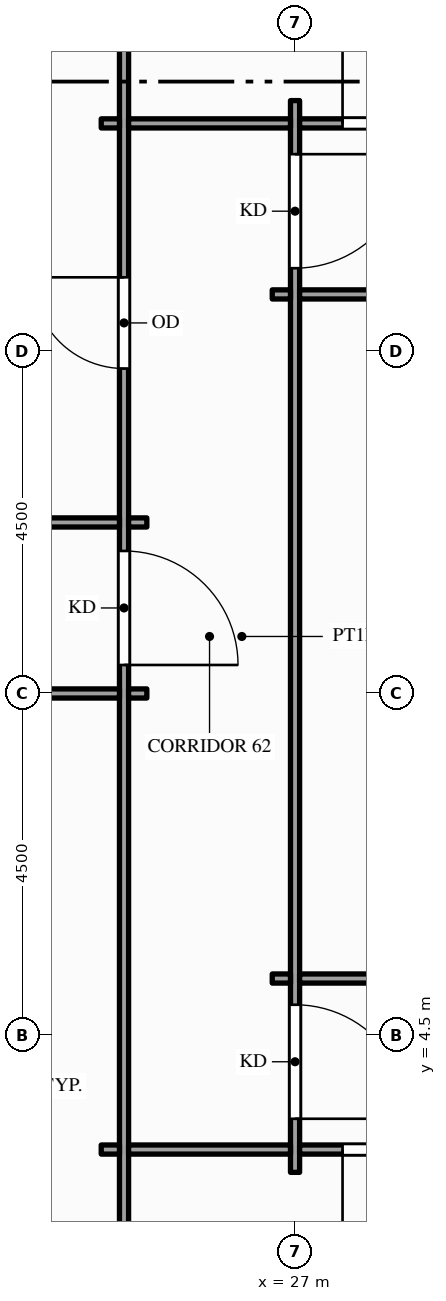
"""IFC4 building model, lengths in metres.
Left out: names, types, materials, properties, quantities, classifications, styles, units other than length and angle.
Written with IfcOpenShell. Run it as: python <this file> out.ifc"""

import sys

from ifc_helpers import new_model, si_unit, direction, frame, frame_2d, origin, place, context, subcontext, project, spatial, rectangle, extrude, element, fill, save


model = new_model("IFC4")
c1 = context("Model", 3, precision=1e-05, world=origin(), true_north=direction((0.0, 1.0)))
c2 = subcontext(c1, "Body", "Model", "MODEL_VIEW")
j1 = project(units=[si_unit("LENGTHUNIT", "METRE"), si_unit("PLANEANGLEUNIT", "RADIAN")], contexts=[c1])
p1 = place(None, origin())
s1 = spatial("IfcSite", under=j1, at=p1, CompositionType="ELEMENT")
p2 = place(p1, origin())
s2 = spatial("IfcBuilding", under=s1, at=p2, CompositionType="ELEMENT")
p3 = place(p2, frame((0.0, 0.0, 195.0)))
s3 = spatial("IfcBuildingStorey", under=s2, at=p3, CompositionType="ELEMENT", Elevation=195.0)
p4 = place(p3, frame((24.75, -1.35, 0.0), z_axis=(0.0, 0.0, 1.0), x_axis=(0.0, 1.0, 0.0)))
e1 = element("IfcWall", 1, at=p4, inside=s3, PredefinedType="PARTITIONING", context=c2, shape_type="SweptSolid", body=[
    extrude(rectangle(XDim=24.101, YDim=0.12, at=frame_2d((12.05, 0.0))), origin(), (0.0, 0.0, 1.0), 2.76),
])
p5 = place(p4, frame((10.725, 0.0, 0.0)))
e2 = element("IfcOpeningElement", 2, at=p5, cuts=e1, PredefinedType="OPENING", context=c2, shape_type="SweptSolid", body=[
    extrude(rectangle(XDim=1.5, YDim=2.1, at=frame_2d((0.75, 1.05))), frame((0.0, 0.07, 0.0), z_axis=(0.0, -1.0, 0.0), x_axis=(1.0, 0.0, 0.0)), (0.0, 0.0, 1.0), 0.14),
])
p6 = place(p4, frame((14.625, 0.0, 0.0)))
e3 = element("IfcOpeningElement", 3, at=p6, cuts=e1, PredefinedType="OPENING", context=c2, shape_type="SweptSolid", body=[
    extrude(rectangle(XDim=1.2, YDim=2.1, at=frame_2d((0.6, 1.05))), frame((0.0, 0.07, 0.0), z_axis=(0.0, -1.0, 0.0), x_axis=(1.0, 0.0, 0.0)), (0.0, 0.0, 1.0), 0.14),
])
p7 = place(p3, frame((27.0, 2.7, 0.0), z_axis=(0.0, 0.0, 1.0), x_axis=(0.0, 1.0, 0.0)))
e4 = element("IfcWall", 4, at=p7, inside=s3, PredefinedType="PARTITIONING", context=c2, shape_type="SweptSolid", body=[
    extrude(rectangle(XDim=14.1, YDim=0.12, at=frame_2d((7.05, 0.0))), origin(), (0.0, 0.0, 1.0), 2.87),
])
p8 = place(p7, frame((0.705, 0.0, 0.0)))
e5 = element("IfcOpeningElement", 5, at=p8, cuts=e4, PredefinedType="OPENING", context=c2, shape_type="SweptSolid", body=[
    extrude(rectangle(XDim=1.5, YDim=2.1, at=frame_2d((0.75, 1.05))), frame((0.0, 0.07, 0.0), z_axis=(0.0, -1.0, 0.0), x_axis=(1.0, 0.0, 0.0)), (0.0, 0.0, 1.0), 0.14),
])
p9 = place(p7, frame((11.895, 0.0, 0.0)))
e6 = element("IfcOpeningElement", 6, at=p9, cuts=e4, PredefinedType="OPENING", context=c2, shape_type="SweptSolid", body=[
    extrude(rectangle(XDim=1.5, YDim=2.1, at=frame_2d((0.75, 1.05))), frame((0.0, 0.07, 0.0), z_axis=(0.0, -1.0, 0.0), x_axis=(1.0, 0.0, 0.0)), (0.0, 0.0, 1.0), 0.14),
])
p10 = place(p3, frame((24.45, 3.0, 0.0), z_axis=(0.0, 0.0, 1.0), x_axis=(1.0, 0.0, 0.0)))
e7 = element("IfcWall", 7, at=p10, inside=s3, PredefinedType="PARTITIONING", context=c2, shape_type="SweptSolid", body=[
    extrude(rectangle(XDim=0.24, YDim=0.12, at=frame_2d((0.12, 0.0))), origin(), (0.0, 0.0, 1.0), 2.76),
])
p11 = place(p3, frame((24.81, 3.0, 0.0), z_axis=(0.0, 0.0, 1.0), x_axis=(1.0, 0.0, 0.0)))
e8 = element("IfcWall", 8, at=p11, inside=s3, PredefinedType="PARTITIONING", context=c2, shape_type="SweptSolid", body=[
    extrude(rectangle(XDim=2.13, YDim=0.12, at=frame_2d((1.065, 0.0))), origin(), (0.0, 0.0, 1.0), 2.76),
])
p12 = place(p3, frame((27.06, 3.0, 0.0), z_axis=(0.0, 0.0, 1.0), x_axis=(1.0, 0.0, 0.0)))
e9 = element("IfcWall", 9, at=p12, inside=s3, PredefinedType="PARTITIONING", context=c2, shape_type="SweptSolid", body=[
    extrude(rectangle(XDim=2.13, YDim=0.12, at=frame_2d((1.065, 0.0))), origin(), (0.0, 0.0, 1.0), 2.87),
])
p13 = place(p12, frame((0.565, 0.0, 0.0)))
e10 = element("IfcOpeningElement", 10, at=p13, cuts=e9, PredefinedType="OPENING", context=c2, shape_type="SweptSolid", body=[
    extrude(rectangle(XDim=1.0, YDim=2.1, at=frame_2d((0.5, 1.05))), frame((0.0, 0.07, 0.0), z_axis=(0.0, -1.0, 0.0), x_axis=(1.0, 0.0, 0.0)), (0.0, 0.0, 1.0), 0.14),
])
p14 = place(p3, frame((26.7, 5.25, 0.0), z_axis=(0.0, 0.0, 1.0), x_axis=(1.0, 0.0, 0.0)))
e11 = element("IfcWall", 11, at=p14, inside=s3, PredefinedType="PARTITIONING", context=c2, shape_type="SweptSolid", body=[
    extrude(rectangle(XDim=0.24, YDim=0.12, at=frame_2d((0.12, 0.0))), origin(), (0.0, 0.0, 1.0), 2.87),
])
p15 = place(p3, frame((27.06, 5.25, 0.0), z_axis=(0.0, 0.0, 1.0), x_axis=(1.0, 0.0, 0.0)))
e12 = element("IfcWall", 12, at=p15, inside=s3, PredefinedType="PARTITIONING", context=c2, shape_type="SweptSolid", body=[
    extrude(rectangle(XDim=8.88, YDim=0.12, at=frame_2d((4.44, 0.0))), origin(), (0.0, 0.0, 1.0), 2.87),
])
p16 = place(p15, frame((3.54, 0.0, 0.0)))
e13 = element("IfcOpeningElement", 13, at=p16, cuts=e12, PredefinedType="OPENING", context=c2, shape_type="SweptSolid", body=[
    extrude(rectangle(XDim=1.8, YDim=2.1, at=frame_2d((0.9, 1.05))), frame((0.0, 0.07, 0.0), z_axis=(0.0, -1.0, 0.0), x_axis=(1.0, 0.0, 0.0)), (0.0, 0.0, 1.0), 0.14),
])
p17 = place(p3, frame((18.06, 9.0, 0.0), z_axis=(0.0, 0.0, 1.0), x_axis=(1.0, 0.0, 0.0)))
e14 = element("IfcWall", 14, at=p17, inside=s3, PredefinedType="PARTITIONING", context=c2, shape_type="SweptSolid", body=[
    extrude(rectangle(XDim=6.63, YDim=0.12, at=frame_2d((3.315, 0.0))), origin(), (0.0, 0.0, 1.0), 2.76),
])
p18 = place(p17, frame((2.715, 0.0, 0.0)))
e15 = element("IfcOpeningElement", 15, at=p18, cuts=e14, PredefinedType="OPENING", context=c2, shape_type="SweptSolid", body=[
    extrude(rectangle(XDim=1.2, YDim=2.1, at=frame_2d((0.6, 1.05))), frame((0.0, 0.07, 0.0), z_axis=(0.0, -1.0, 0.0), x_axis=(1.0, 0.0, 0.0)), (0.0, 0.0, 1.0), 0.14),
])
p19 = place(p3, frame((24.81, 9.0, 0.0), z_axis=(0.0, 0.0, 1.0), x_axis=(1.0, 0.0, 0.0)))
e16 = element("IfcWall", 16, at=p19, inside=s3, PredefinedType="PARTITIONING", context=c2, shape_type="SweptSolid", body=[
    extrude(rectangle(XDim=0.24, YDim=0.12, at=frame_2d((0.12, 0.0))), origin(), (0.0, 0.0, 1.0), 2.76),
])
p20 = place(p3, frame((11.31, 11.25, 0.0), z_axis=(0.0, 0.0, 1.0), x_axis=(1.0, 0.0, 0.0)))
e17 = element("IfcWall", 17, at=p20, inside=s3, PredefinedType="PARTITIONING", context=c2, shape_type="SweptSolid", body=[
    extrude(rectangle(XDim=13.38, YDim=0.12, at=frame_2d((6.69, 0.0))), origin(), (0.0, 0.0, 1.0), 2.76),
])
p21 = place(p20, frame((3.54, 0.0, 0.0)))
e18 = element("IfcOpeningElement", 18, at=p21, cuts=e17, PredefinedType="OPENING", context=c2, shape_type="SweptSolid", body=[
    extrude(rectangle(XDim=1.8, YDim=2.1, at=frame_2d((0.9, 1.05))), frame((0.0, 0.07, 0.0), z_axis=(0.0, -1.0, 0.0), x_axis=(1.0, 0.0, 0.0)), (0.0, 0.0, 1.0), 0.14),
])
p22 = place(p3, frame((24.81, 11.25, 0.0), z_axis=(0.0, 0.0, 1.0), x_axis=(1.0, 0.0, 0.0)))
e19 = element("IfcWall", 19, at=p22, inside=s3, PredefinedType="PARTITIONING", context=c2, shape_type="SweptSolid", body=[
    extrude(rectangle(XDim=0.24, YDim=0.12, at=frame_2d((0.12, 0.0))), origin(), (0.0, 0.0, 1.0), 2.76),
])
p23 = place(p3, frame((26.7, 14.25, 0.0), z_axis=(0.0, 0.0, 1.0), x_axis=(1.0, 0.0, 0.0)))
e20 = element("IfcWall", 20, at=p23, inside=s3, PredefinedType="PARTITIONING", context=c2, shape_type="SweptSolid", body=[
    extrude(rectangle(XDim=0.24, YDim=0.12, at=frame_2d((0.12, 0.0))), origin(), (0.0, 0.0, 1.0), 2.87),
])
p24 = place(p3, frame((27.06, 14.25, 0.0), z_axis=(0.0, 0.0, 1.0), x_axis=(1.0, 0.0, 0.0)))
e21 = element("IfcWall", 21, at=p24, inside=s3, PredefinedType="PARTITIONING", context=c2, shape_type="SweptSolid", body=[
    extrude(rectangle(XDim=8.88, YDim=0.12, at=frame_2d((4.44, 0.0))), origin(), (0.0, 0.0, 1.0), 2.87),
])
p25 = place(p3, frame((24.45, 16.5, 0.0), z_axis=(0.0, 0.0, 1.0), x_axis=(1.0, 0.0, 0.0)))
e22 = element("IfcWall", 22, at=p25, inside=s3, PredefinedType="PARTITIONING", context=c2, shape_type="SweptSolid", body=[
    extrude(rectangle(XDim=0.24, YDim=0.12, at=frame_2d((0.12, 0.0))), origin(), (0.0, 0.0, 1.0), 2.76),
])
p26 = place(p3, frame((24.81, 16.5, 0.0), z_axis=(0.0, 0.0, 1.0), x_axis=(1.0, 0.0, 0.0)))
e23 = element("IfcWall", 23, at=p26, inside=s3, PredefinedType="PARTITIONING", context=c2, shape_type="SweptSolid", body=[
    extrude(rectangle(XDim=2.13, YDim=0.12, at=frame_2d((1.065, 0.0))), origin(), (0.0, 0.0, 1.0), 2.76),
])
p27 = place(p3, frame((27.06, 16.5, 0.0), z_axis=(0.0, 0.0, 1.0), x_axis=(1.0, 0.0, 0.0)))
e24 = element("IfcWall", 24, at=p27, inside=s3, PredefinedType="PARTITIONING", context=c2, shape_type="SweptSolid", body=[
    extrude(rectangle(XDim=2.13, YDim=0.12, at=frame_2d((1.065, 0.0))), origin(), (0.0, 0.0, 1.0), 2.87),
])
p28 = place(p27, frame((0.565, 0.0, 0.0)))
e25 = element("IfcOpeningElement", 25, at=p28, cuts=e24, PredefinedType="OPENING", context=c2, shape_type="SweptSolid", body=[
    extrude(rectangle(XDim=1.0, YDim=2.1, at=frame_2d((0.5, 1.05))), frame((0.0, 0.07, 0.0), z_axis=(0.0, -1.0, 0.0), x_axis=(1.0, 0.0, 0.0)), (0.0, 0.0, 1.0), 0.14),
])
p29 = place(p5, origin())
e26 = element("IfcDoor", 26, at=p29, inside=s3, OperationType="SINGLE_SWING_LEFT", PredefinedType="DOOR", context=c2, shape_type="SweptSolid", body=[
    extrude(rectangle(XDim=1.5, YDim=2.1, at=frame_2d((0.75, 1.05))), frame((0.0, 0.025, 0.0), z_axis=(0.0, -1.0, 0.0), x_axis=(1.0, 0.0, 0.0)), (0.0, 0.0, 1.0), 0.05),
])
fill(e2, e26)
p30 = place(p8, origin())
e27 = element("IfcDoor", 27, at=p30, inside=s3, OperationType="SINGLE_SWING_LEFT", PredefinedType="DOOR", context=c2, shape_type="SweptSolid", body=[
    extrude(rectangle(XDim=1.5, YDim=2.1, at=frame_2d((0.75, 1.05))), frame((0.0, 0.025, 0.0), z_axis=(0.0, -1.0, 0.0), x_axis=(1.0, 0.0, 0.0)), (0.0, 0.0, 1.0), 0.05),
])
fill(e5, e27)
p31 = place(p9, origin())
e28 = element("IfcDoor", 28, at=p31, inside=s3, OperationType="SINGLE_SWING_RIGHT", PredefinedType="DOOR", context=c2, shape_type="SweptSolid", body=[
    extrude(rectangle(XDim=1.5, YDim=2.1, at=frame_2d((0.75, 1.05))), frame((0.0, 0.025, 0.0), z_axis=(0.0, -1.0, 0.0), x_axis=(1.0, 0.0, 0.0)), (0.0, 0.0, 1.0), 0.05),
])
fill(e6, e28)
p32 = place(p13, origin())
e29 = element("IfcDoor", 29, at=p32, inside=s3, OperationType="SINGLE_SWING_LEFT", PredefinedType="DOOR", context=c2, shape_type="SweptSolid", body=[
    extrude(rectangle(XDim=1.0, YDim=2.1, at=frame_2d((0.5, 1.05))), frame((0.0, 0.025, 0.0), z_axis=(0.0, -1.0, 0.0), x_axis=(1.0, 0.0, 0.0)), (0.0, 0.0, 1.0), 0.05),
])
fill(e10, e29)
p33 = place(p28, origin())
e30 = element("IfcDoor", 30, at=p33, inside=s3, OperationType="SINGLE_SWING_LEFT", PredefinedType="DOOR", context=c2, shape_type="SweptSolid", body=[
    extrude(rectangle(XDim=1.0, YDim=2.1, at=frame_2d((0.5, 1.05))), frame((0.0, 0.025, 0.0), z_axis=(0.0, -1.0, 0.0), x_axis=(1.0, 0.0, 0.0)), (0.0, 0.0, 1.0), 0.05),
])
fill(e25, e30)
p34 = place(p6, origin())
e31 = element("IfcDoor", 31, at=p34, inside=s3, OperationType="SINGLE_SWING_RIGHT", PredefinedType="DOOR", context=c2, shape_type="SweptSolid", body=[
    extrude(rectangle(XDim=1.2, YDim=2.1, at=frame_2d((0.6, 1.05))), frame((0.0, 0.025, 0.0), z_axis=(0.0, -1.0, 0.0), x_axis=(1.0, 0.0, 0.0)), (0.0, 0.0, 1.0), 0.05),
])
fill(e3, e31)
save(model, sys.argv[1])
